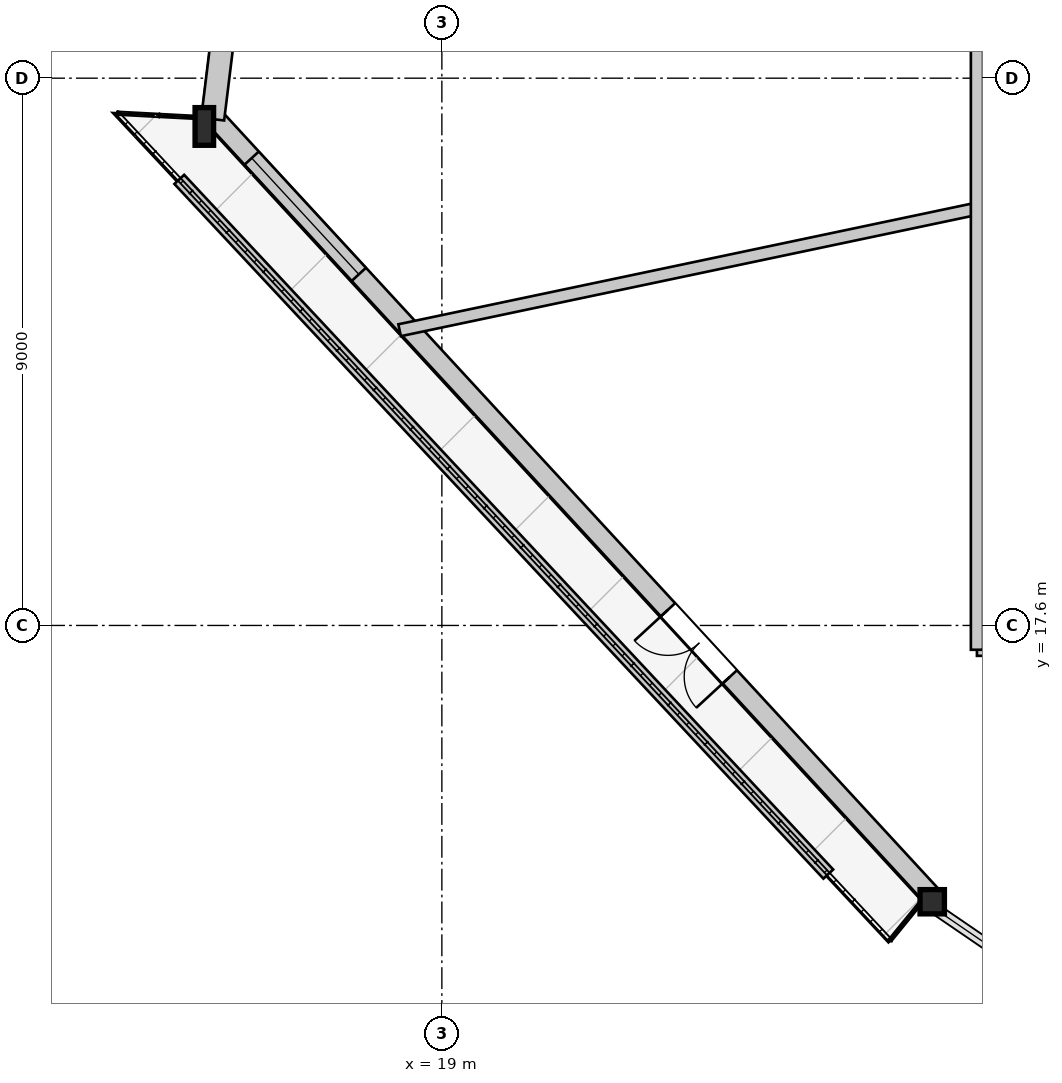
"""IFC4 building model, lengths in metres.
Left out: names, types, materials, properties, quantities, classifications, styles, units other than length and angle.
Written with IfcOpenShell. Run it as: python <this file> out.ifc"""

import sys

from ifc_helpers import new_model, si_unit, direction, frame, frame_2d, origin, origin_2d, place, context, subcontext, project, spatial, rectangle, i_section, extrude, source, transform, mapped, element, fill, save


model = new_model("IFC4")
c1 = context("Model", 3, precision=1e-05, world=origin(), true_north=direction((0.0, 1.0)))
c2 = subcontext(c1, "Body", "Model", "MODEL_VIEW")
j1 = project(units=[si_unit("LENGTHUNIT", "METRE"), si_unit("PLANEANGLEUNIT", "RADIAN")], contexts=[c1])
p1 = place(None, origin())
s1 = spatial("IfcSite", under=j1, at=p1, CompositionType="ELEMENT")
p2 = place(p1, origin())
s2 = spatial("IfcBuilding", under=s1, at=p2, CompositionType="ELEMENT")
p3 = place(p2, frame((0.0, 0.0, 241.7)))
s3 = spatial("IfcBuildingStorey", under=s2, at=p3, CompositionType="ELEMENT", Elevation=241.7)
m1 = source(origin(), c2, "Body", "SweptSolid", [
    extrude(i_section(OverallWidth=0.305, OverallDepth=0.62, WebThickness=0.021, FlangeThickness=0.04, at=origin_2d()), origin(), (0.0, 0.0, 1.0), 3.449),
])
p4 = place(p3, frame((15.042, 25.951, 0.0), z_axis=(0.029803367502, -0.083746754763, 0.996041284462), x_axis=(0.942119687121, 0.335276744107, 0.0)))
e1 = element("IfcColumn", 1, at=p4, inside=s3, PredefinedType="COLUMN", context=c2, shape_type="MappedRepresentation", body=[
    mapped(m1, transform((0.0, 0.0, 0.0), x_axis=(1.0, 0.0, 0.0), y_axis=(0.0, 1.0, 0.0), z_axis=(0.0, 0.0, 1.0), scale=1.0)),
])
m2 = source(origin(), c2, "Body", "SweptSolid", [
    extrude(i_section(OverallWidth=0.401, OverallDepth=0.399, WebThickness=0.022, FlangeThickness=0.034, at=origin_2d()), origin(), (0.0, 0.0, 1.0), 3.45),
])
p5 = place(p3, frame((26.906, 13.079, 0.0), z_axis=(0.09164447081, -0.01316283519, 0.99570479096), x_axis=(0.142170385525, 0.989842200292, 0.0)))
e2 = element("IfcColumn", 2, at=p5, inside=s3, PredefinedType="COLUMN", context=c2, shape_type="MappedRepresentation", body=[
    mapped(m2, transform((0.0, 0.0, 0.0), x_axis=(1.0, 0.0, 0.0), y_axis=(0.0, 1.0, 0.0), z_axis=(0.0, 0.0, 1.0), scale=1.0)),
])
p6 = place(p3, frame((27.024, 13.188, 0.0), z_axis=(0.0, 0.0, 1.0), x_axis=(-0.677764411213, 0.735279132638, 0.0)))
e3 = element("IfcWall", 3, at=p6, inside=s3, PredefinedType="SOLIDWALL", context=c2, shape_type="SweptSolid", body=[
    extrude(rectangle(XDim=17.506, YDim=0.32, at=frame_2d((8.753, 0.0))), origin(), (0.0, 0.0, 1.0), 2.872),
])
p7 = place(p6, frame((4.852, 0.0, 0.0)))
e4 = element("IfcOpeningElement", 4, at=p7, cuts=e3, PredefinedType="OPENING", context=c2, shape_type="SweptSolid", body=[
    extrude(rectangle(XDim=1.5, YDim=2.3, at=frame_2d((0.75, 1.15))), frame((0.0, 0.17, 0.0), z_axis=(0.0, -1.0, 0.0), x_axis=(1.0, 0.0, 0.0)), (0.0, 0.0, 1.0), 0.34),
])
p8 = place(p6, frame((13.854, 0.0, 0.402)))
e5 = element("IfcOpeningElement", 5, at=p8, cuts=e3, PredefinedType="OPENING", context=c2, shape_type="SweptSolid", body=[
    extrude(rectangle(XDim=2.6, YDim=2.35, at=frame_2d((1.3, 1.175))), frame((0.0, 0.17, 0.0), z_axis=(0.0, -1.0, 0.0), x_axis=(1.0, 0.0, 0.0)), (0.0, 0.0, 1.0), 0.34),
])
p9 = place(p3, frame((15.23, 25.927, 0.0), z_axis=(0.0, 0.0, 1.0), x_axis=(0.121878844646, 0.992544984989, 0.0)))
e6 = element("IfcWall", 6, at=p9, inside=s3, PredefinedType="SOLIDWALL", context=c2, shape_type="SweptSolid", body=[
    extrude(rectangle(XDim=3.387, YDim=0.38, at=frame_2d((1.694, 0.0))), origin(), (0.0, 0.0, 1.0), 2.872),
])
p10 = place(p3, frame((14.681, 24.936, 0.0), z_axis=(0.0, 0.0, 1.0), x_axis=(0.682707047276, -0.730692197577, 0.0)))
e7 = element("IfcWall", 7, at=p10, inside=s3, PredefinedType="PARAPET", context=c2, shape_type="SweptSolid", body=[
    extrude(rectangle(XDim=15.635, YDim=0.22, at=frame_2d((7.817, 0.0))), origin(), (0.0, 0.0, 1.0), 0.3),
])
p11 = place(p3, frame((27.8, 24.453, 0.0), z_axis=(0.0, 0.0, 1.0), x_axis=(-0.978564998711, -0.205938202619, 0.0)))
e8 = element("IfcWall", 8, at=p11, inside=s3, PredefinedType="PARTITIONING", context=c2, shape_type="SweptSolid", body=[
    extrude(rectangle(XDim=9.703, YDim=0.2, at=frame_2d((4.852, 0.0))), origin(), (0.0, 0.0, 1.0), 3.38),
])
p12 = place(p3, frame((27.8, 17.2, 0.0), z_axis=(0.0, 0.0, 1.0), x_axis=(1.0, 0.0, 0.0)))
e9 = element("IfcWall", 9, at=p12, inside=s3, PredefinedType="PARTITIONING", context=c2, shape_type="SweptSolid", body=[
    extrude(rectangle(XDim=20.4, YDim=0.2, at=frame_2d((10.2, 0.0))), origin(), (0.0, 0.0, 1.0), 3.38),
])
p13 = place(p12, frame((4.231, 0.0, 0.0)))
e10 = element("IfcOpeningElement", 10, at=p13, cuts=e9, PredefinedType="OPENING", context=c2, shape_type="SweptSolid", body=[
    extrude(rectangle(XDim=1.05, YDim=2.2, at=frame_2d((0.525, 1.1))), frame((0.0, 0.11, 0.0), z_axis=(0.0, -1.0, 0.0), x_axis=(1.0, 0.0, 0.0)), (0.0, 0.0, 1.0), 0.22),
])
p14 = place(p12, frame((15.174, 0.0, 0.0)))
e11 = element("IfcOpeningElement", 11, at=p14, cuts=e9, PredefinedType="OPENING", context=c2, shape_type="SweptSolid", body=[
    extrude(rectangle(XDim=1.05, YDim=2.2, at=frame_2d((0.525, 1.1))), frame((0.0, 0.11, 0.0), z_axis=(0.0, -1.0, 0.0), x_axis=(1.0, 0.0, 0.0)), (0.0, 0.0, 1.0), 0.22),
])
p15 = place(p3, frame((27.8, 17.2, 0.0), z_axis=(0.0, 0.0, 1.0), x_axis=(0.0, 1.0, 0.0)))
e12 = element("IfcWall", 12, at=p15, inside=s3, PredefinedType="PARTITIONING", context=c2, shape_type="SweptSolid", body=[
    extrude(rectangle(XDim=18.8, YDim=0.2, at=frame_2d((9.4, 0.0))), origin(), (0.0, 0.0, 1.0), 3.38),
])
m3 = source(origin(), c2, "Body", "SweptSolid", [
    extrude(rectangle(XDim=1.5, YDim=2.3, at=frame_2d((0.75, 1.15))), frame((0.0, 0.025, 0.0), z_axis=(0.0, -1.0, 0.0), x_axis=(1.0, 0.0, 0.0)), (0.0, 0.0, 1.0), 0.05),
])
p16 = place(p7, origin())
e13 = element("IfcDoor", 13, at=p16, inside=s3, OperationType="DOUBLE_DOOR_SINGLE_SWING", PredefinedType="DOOR", context=c2, shape_type="MappedRepresentation", body=[
    mapped(m3, transform((0.0, 0.0, 0.0), x_axis=(1.0, 0.0, 0.0), y_axis=(0.0, 1.0, 0.0), z_axis=(0.0, 0.0, 1.0), scale=1.0)),
])
fill(e4, e13)
m4 = source(origin(), c2, "Body", "SweptSolid", [
    extrude(rectangle(XDim=2.6, YDim=2.35, at=frame_2d((1.3, 1.175))), frame((0.0, 0.03, 0.0), z_axis=(0.0, -1.0, 0.0), x_axis=(1.0, 0.0, 0.0)), (0.0, 0.0, 1.0), 0.06),
])
p17 = place(p8, origin())
e14 = element("IfcWindow", 14, at=p17, inside=s3, PartitioningType="SINGLE_PANEL", PredefinedType="WINDOW", context=c2, shape_type="MappedRepresentation", body=[
    mapped(m4, transform((0.0, 0.0, 0.0), x_axis=(1.0, 0.0, 0.0), y_axis=(0.0, 1.0, 0.0), z_axis=(0.0, 0.0, 1.0), scale=1.0)),
])
fill(e5, e14)
save(model, sys.argv[1])
